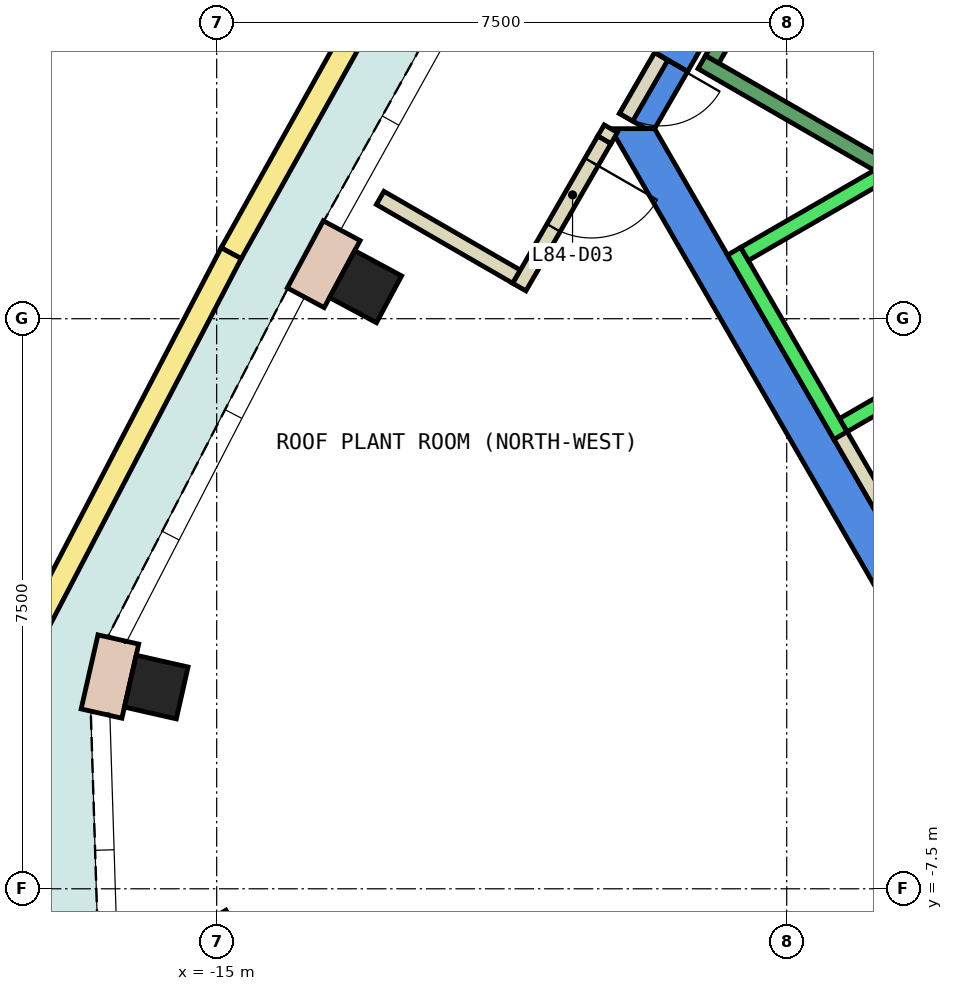
"""IFC4 building model, lengths in metres.
Left out: names, types, materials, properties, quantities, classifications, styles, units other than length and angle.
Written with IfcOpenShell. Run it as: python <this file> out.ifc"""

import sys

from ifc_helpers import new_model, si_unit, direction, frame, frame_2d, origin, origin_2d, place, context, subcontext, project, spatial, polyline, rectangle, outline, extrude, element, fill, save


model = new_model("IFC4")
c1 = context("Model", 3, precision=1e-05, world=origin(), true_north=direction((0.0, 1.0)))
c2 = subcontext(c1, "Body", "Model", "MODEL_VIEW")
j1 = project(units=[si_unit("LENGTHUNIT", "METRE"), si_unit("PLANEANGLEUNIT", "RADIAN")], contexts=[c1])
p1 = place(None, origin())
s1 = spatial("IfcSite", under=j1, at=p1, CompositionType="ELEMENT")
p2 = place(p1, origin())
s2 = spatial("IfcBuilding", under=s1, at=p2, CompositionType="ELEMENT")
p3 = place(p2, frame((0.0, 0.0, 358.4)))
s3 = spatial("IfcBuildingStorey", under=s2, at=p3, CompositionType="ELEMENT", Elevation=358.4)
for number, where, z_axis, x_axis in (
    (1, (-13.041, 0.421, 0.0), (0.0, 0.0, 1.0), (0.473, 0.881, 0.0)),
    (2, (-15.795, -4.846, 0.0), (0.0, 0.0, 1.0), (0.221, 0.975, 0.0)),
):
    element("IfcColumn", number, at=place(p3, frame(where, z_axis=z_axis, x_axis=x_axis)), inside=s3, PredefinedType="COLUMN", context=c2, shape_type="SweptSolid", body=[
        extrude(rectangle(XDim=0.7, YDim=0.7, at=origin_2d()), origin(), (0.0, 0.0, 1.0), 4.05),
    ])
p4 = place(p3, frame((-15.134, -8.738, 0.0), z_axis=(0.0, 0.0, 1.0), x_axis=(0.866025403784, 0.5, 0.0)))
e3 = element("IfcColumn", 3, at=p4, inside=s3, PredefinedType="COLUMN", context=c2, shape_type="SweptSolid", body=[
    extrude(rectangle(XDim=1.4, YDim=1.4, at=origin_2d()), origin(), (0.0, 0.0, 1.0), 4.05),
])
p5 = place(p3, frame((0.0, 0.0, -0.45)))
e4 = element("IfcWall", 4, at=p5, inside=s3, PredefinedType="SHEAR", context=c2, shape_type="SweptSolid", body=[
    extrude(outline(polyline([(-9.236, 3.502), (-8.803, 3.253), (-4.619, 10.5), (-4.907, 11.0), (-9.236, 3.502)])), origin(), (0.0, 0.0, 1.0), 4.5),
])
p6 = place(p3, frame((0.0, 0.0, 3.6)))
e5 = element("IfcWall", 5, at=p6, inside=s3, PredefinedType="SHEAR", context=c2, shape_type="SweptSolid", body=[
    extrude(outline(polyline([(-9.7, 2.7), (-9.354, 2.5), (-9.238, 2.5), (-8.803, 3.253), (-9.236, 3.502), (-9.7, 2.7)])), origin(), (0.0, 0.0, 1.0), 0.45),
])
p7 = place(p3, frame((0.0, 0.0, -0.45)))
e6 = element("IfcWall", 6, at=p7, inside=s3, PredefinedType="SHEAR", context=c2, shape_type="SweptSolid", body=[
    extrude(outline(polyline([(-9.815, 2.5), (-4.907, -6.0), (-4.619, -5.5), (-9.238, 2.5), (-9.815, 2.5)])), origin(), (0.0, 0.0, 1.0), 4.5),
])
p8 = place(p3, frame((-13.355, 1.158, 0.0), z_axis=(0.0, 0.0, 1.0), x_axis=(-0.472498926772, -0.881331245446, 0.0)))
e7 = element("IfcWall", 7, at=p8, inside=s3, PredefinedType="STANDARD", context=c2, shape_type="SweptSolid", body=[
    extrude(rectangle(XDim=1.001, YDim=0.55, at=frame_2d((0.5, 0.0))), origin(), (0.0, 0.0, 1.0), 4.05),
])
p9 = place(p3, frame((-16.294, -4.22, 0.0), z_axis=(0.0, 0.0, 1.0), x_axis=(-0.220987805865, -0.975276570855, 0.0)))
e8 = element("IfcWall", 8, at=p9, inside=s3, PredefinedType="STANDARD", context=c2, shape_type="SweptSolid", body=[
    extrude(rectangle(XDim=1.0, YDim=0.55, at=frame_2d((0.5, 0.0))), origin(), (0.0, 0.0, 1.0), 4.05),
])
p10 = place(p3, origin())
e9 = element("IfcWall", 9, at=p10, inside=s3, PredefinedType="PARAPET", context=c2, shape_type="SweptSolid", body=[
    extrude(outline(polyline([(-11.691, 6.75), (-14.941, 0.933), (-14.677, 0.79), (-11.431, 6.6), (-11.691, 6.75)])), origin(), (0.0, 0.0, 1.0), 1.1),
])
p11 = place(p3, origin())
e10 = element("IfcWall", 10, at=p11, inside=s3, PredefinedType="PARAPET", context=c2, shape_type="SweptSolid", body=[
    extrude(outline(polyline([(-14.941, 0.933), (-18.024, -4.974), (-17.722, -5.044), (-14.677, 0.79), (-14.941, 0.933)])), origin(), (0.0, 0.0, 1.0), 1.1),
])
p12 = place(p3, frame((-5.492, -3.788, 0.0), z_axis=(0.0, 0.0, 1.0), x_axis=(-0.500008949224, 0.866020236886, 0.0)))
e11 = element("IfcWall", 11, at=p12, inside=s3, PredefinedType="PARTITIONING", context=c2, shape_type="SweptSolid", body=[
    extrude(rectangle(XDim=2.68, YDim=0.2, at=frame_2d((1.34, 0.0))), origin(), (0.0, 0.0, 1.0), 4.05),
])
p13 = place(p3, frame((-11.055, 0.553, 0.0), z_axis=(0.0, 0.0, 1.0), x_axis=(-0.865971676864, 0.500093046212, 0.0)))
e12 = element("IfcWall", 12, at=p13, inside=s3, PredefinedType="PARTITIONING", context=c2, shape_type="SweptSolid", body=[
    extrude(rectangle(XDim=2.072, YDim=0.2, at=frame_2d((1.036, 0.0))), origin(), (0.0, 0.0, 1.0), 4.05),
])
p14 = place(p3, frame((-9.815, 2.5, 0.0), z_axis=(0.0, 0.0, 1.0), x_axis=(-0.5004692653, -0.865754303766, 0.0)))
e13 = element("IfcWall", 13, at=p14, inside=s3, PredefinedType="PARTITIONING", context=c2, shape_type="SweptSolid", body=[
    extrude(rectangle(XDim=0.17, YDim=0.2, at=frame_2d((0.085, 0.0))), origin(), (0.0, 0.0, 1.0), 2.4),
])
p15 = place(p3, frame((-9.15, 3.452, 0.0), z_axis=(0.0, 0.0, 1.0), x_axis=(-0.500079945886, -0.865979242085, 0.0)))
e14 = element("IfcWall", 14, at=p15, inside=s3, PredefinedType="PARTITIONING", context=c2, shape_type="SweptSolid", body=[
    extrude(rectangle(XDim=0.926, YDim=0.2, at=frame_2d((0.463, 0.0))), origin(), (0.0, 0.0, 1.0), 2.4),
])
p16 = place(p15, frame((0.017, 0.0, 0.0)))
e15 = element("IfcOpeningElement", 15, at=p16, cuts=e14, PredefinedType="OPENING", context=c2, shape_type="SweptSolid", body=[
    extrude(rectangle(XDim=0.9, YDim=2.1, at=frame_2d((0.45, 1.05))), frame((0.0, 0.11, 0.0), z_axis=(0.0, -1.0, 0.0), x_axis=(1.0, 0.0, 0.0)), (0.0, 0.0, 1.0), 0.22),
])
p17 = place(p3, frame((-9.9, 2.353, 0.0), z_axis=(0.0, 0.0, 1.0), x_axis=(-0.499942933724, -0.866058348508, 0.0)))
e16 = element("IfcWall", 16, at=p17, inside=s3, PredefinedType="PARTITIONING", context=c2, shape_type="SweptSolid", body=[
    extrude(rectangle(XDim=2.237, YDim=0.2, at=frame_2d((1.118, 0.0))), origin(), (0.0, 0.0, 1.0), 4.05),
])
p18 = place(p17, frame((0.336, 0.0, 0.0)))
e17 = element("IfcOpeningElement", 17, at=p18, cuts=e16, PredefinedType="OPENING", context=c2, shape_type="SweptSolid", body=[
    extrude(rectangle(XDim=1.0, YDim=2.1, at=frame_2d((0.5, 1.05))), frame((0.0, 0.11, 0.0), z_axis=(0.0, -1.0, 0.0), x_axis=(1.0, 0.0, 0.0)), (0.0, 0.0, 1.0), 0.22),
])
p19 = place(p3, frame((-8.192, 0.888, 0.0), z_axis=(0.0, 0.0, 1.0), x_axis=(0.49994636267, -0.866056369097, 0.0)))
e18 = element("IfcWall", 18, at=p19, inside=s3, PredefinedType="STANDARD", context=c2, shape_type="SweptSolid", body=[
    extrude(rectangle(XDim=2.8, YDim=0.2, at=frame_2d((1.4, 0.0))), origin(), (0.0, 0.0, 1.0), 4.05),
])
for number, where, z_axis, x_axis in (
    (19, (-5.977, 2.052, 0.0), (0.0, 0.0, 1.0), (-0.866, -0.5, 0.0)),
    (20, (-4.677, -0.2, 0.0), (0.0, 0.0, 1.0), (-0.866, -0.5, 0.0)),
):
    element("IfcWall", number, at=place(p3, frame(where, z_axis=z_axis, x_axis=x_axis)), inside=s3, PredefinedType="STANDARD", context=c2, shape_type="SweptSolid", body=[
        extrude(rectangle(XDim=2.399, YDim=0.2, at=frame_2d((1.2, 0.0))), origin(), (0.0, 0.0, 1.0), 4.05),
    ])
p20 = place(p3, frame((-6.25, 2.01, 0.0), z_axis=(0.0, 0.0, 1.0), x_axis=(-0.86611865017, 0.499838457731, 0.0)))
e21 = element("IfcWall", 21, at=p20, inside=s3, PredefinedType="STANDARD", context=c2, shape_type="SweptSolid", body=[
    extrude(rectangle(XDim=2.733, YDim=0.2, at=frame_2d((1.366, 0.0))), origin(), (0.0, 0.0, 1.0), 4.05),
])
p21 = place(p3, frame((-5.03, 9.388, 0.0), z_axis=(0.0, 0.0, 1.0), x_axis=(-0.499978703459, -0.866037698999, 0.0)))
e22 = element("IfcWall", 22, at=p21, inside=s3, PredefinedType="STANDARD", context=c2, shape_type="SweptSolid", body=[
    extrude(rectangle(XDim=6.9, YDim=0.2, at=frame_2d((3.45, 0.0))), origin(), (0.0, 0.0, 1.0), 4.05),
])
p22 = place(p18, origin())
e23 = element("IfcDoor", 23, at=p22, inside=s3, OperationType="SINGLE_SWING_LEFT", PredefinedType="DOOR", context=c2, shape_type="SweptSolid", body=[
    extrude(rectangle(XDim=1.0, YDim=2.1, at=frame_2d((0.5, 1.05))), frame((0.0, 0.025, 0.0), z_axis=(0.0, -1.0, 0.0), x_axis=(1.0, 0.0, 0.0)), (0.0, 0.0, 1.0), 0.05),
])
fill(e17, e23)
p23 = place(p16, origin())
e24 = element("IfcDoor", 24, at=p23, inside=s3, OperationType="SINGLE_SWING_LEFT", PredefinedType="DOOR", context=c2, shape_type="SweptSolid", body=[
    extrude(rectangle(XDim=0.9, YDim=2.1, at=frame_2d((0.45, 1.05))), frame((0.0, 0.025, 0.0), z_axis=(0.0, -1.0, 0.0), x_axis=(1.0, 0.0, 0.0)), (0.0, 0.0, 1.0), 0.05),
])
fill(e15, e24)
save(model, sys.argv[1])
